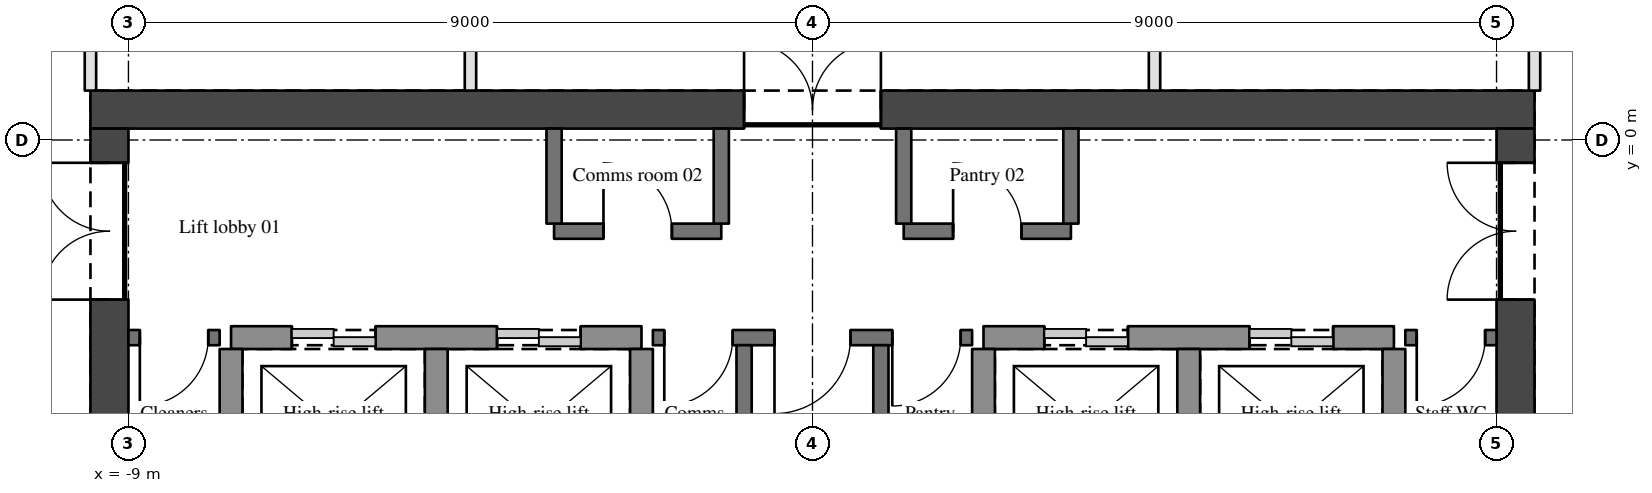
"""IFC4 building model, lengths in metres.
Left out: names, types, materials, properties, quantities, classifications, styles, units other than length and angle.
Written with IfcOpenShell. Run it as: python <this file> out.ifc"""

import sys

from ifc_helpers import new_model, si_unit, direction, frame, frame_2d, origin, place, context, subcontext, project, spatial, rectangle, extrude, element, fill, save


model = new_model("IFC4")
c1 = context("Model", 3, precision=1e-05, world=origin(), true_north=direction((0.0, 1.0)))
c2 = subcontext(c1, "Body", "Model", "MODEL_VIEW")
j1 = project(units=[si_unit("LENGTHUNIT", "METRE"), si_unit("PLANEANGLEUNIT", "RADIAN")], contexts=[c1])
p1 = place(None, origin())
s1 = spatial("IfcSite", under=j1, at=p1, CompositionType="ELEMENT")
p2 = place(p1, origin())
s2 = spatial("IfcBuilding", under=s1, at=p2, CompositionType="ELEMENT")
p3 = place(p2, frame((0.0, 0.0, 206.85)))
s3 = spatial("IfcBuildingStorey", under=s2, at=p3, CompositionType="ELEMENT", Elevation=206.85)
p4 = place(p3, frame((-9.5, 0.4, 0.0), z_axis=(0.0, 0.0, 1.0), x_axis=(1.0, 0.0, 0.0)))
e1 = element("IfcWall", 1, at=p4, inside=s3, PredefinedType="SHEAR", context=c2, shape_type="SweptSolid", body=[
    extrude(rectangle(XDim=19.0, YDim=0.5, at=frame_2d((9.5, 0.0))), origin(), (0.0, 0.0, 1.0), 3.15),
])
p5 = place(p4, frame((8.6, 0.0, 0.0)))
e2 = element("IfcOpeningElement", 2, at=p5, cuts=e1, PredefinedType="OPENING", context=c2, shape_type="SweptSolid", body=[
    extrude(rectangle(XDim=1.8, YDim=2.1, at=frame_2d((0.9, 1.05))), frame((0.0, 0.26, 0.0), z_axis=(0.0, -1.0, 0.0), x_axis=(1.0, 0.0, 0.0)), (0.0, 0.0, 1.0), 0.52),
])
p6 = place(p3, frame((-9.25, -11.5, 0.0), z_axis=(0.0, 0.0, 1.0), x_axis=(0.0, 1.0, 0.0)))
e3 = element("IfcWall", 3, at=p6, inside=s3, PredefinedType="SHEAR", context=c2, shape_type="SweptSolid", body=[
    extrude(rectangle(XDim=11.65, YDim=0.5, at=frame_2d((5.825, 0.0))), origin(), (0.0, 0.0, 1.0), 3.15),
])
p7 = place(p6, frame((9.4, 0.0, 0.0)))
e4 = element("IfcOpeningElement", 4, at=p7, cuts=e3, PredefinedType="OPENING", context=c2, shape_type="SweptSolid", body=[
    extrude(rectangle(XDim=1.8, YDim=2.1, at=frame_2d((0.9, 1.05))), frame((0.0, 0.26, 0.0), z_axis=(0.0, -1.0, 0.0), x_axis=(1.0, 0.0, 0.0)), (0.0, 0.0, 1.0), 0.52),
])
p8 = place(p3, frame((9.25, -11.5, 0.0), z_axis=(0.0, 0.0, 1.0), x_axis=(0.0, 1.0, 0.0)))
e5 = element("IfcWall", 5, at=p8, inside=s3, PredefinedType="SHEAR", context=c2, shape_type="SweptSolid", body=[
    extrude(rectangle(XDim=11.65, YDim=0.5, at=frame_2d((5.825, 0.0))), origin(), (0.0, 0.0, 1.0), 3.15),
])
p9 = place(p8, frame((9.4, 0.0, 0.0)))
e6 = element("IfcOpeningElement", 6, at=p9, cuts=e5, PredefinedType="OPENING", context=c2, shape_type="SweptSolid", body=[
    extrude(rectangle(XDim=1.8, YDim=2.1, at=frame_2d((0.9, 1.05))), frame((0.0, 0.26, 0.0), z_axis=(0.0, -1.0, 0.0), x_axis=(1.0, 0.0, 0.0)), (0.0, 0.0, 1.0), 0.52),
])
p10 = place(p3, frame((-7.8, -2.6, 0.0), z_axis=(0.0, 0.0, 1.0), x_axis=(-1.0, 0.0, 0.0)))
e7 = element("IfcWall", 7, at=p10, inside=s3, PredefinedType="SOLIDWALL", context=c2, shape_type="SweptSolid", body=[
    extrude(rectangle(XDim=1.2, YDim=0.2, at=frame_2d((0.6, 0.0))), origin(), (0.0, 0.0, 1.0), 2.85),
])
p11 = place(p10, frame((0.15, 0.0, 0.0)))
e8 = element("IfcOpeningElement", 8, at=p11, cuts=e7, PredefinedType="OPENING", context=c2, shape_type="SweptSolid", body=[
    extrude(rectangle(XDim=0.9, YDim=2.1, at=frame_2d((0.45, 1.05))), frame((0.0, 0.11, 0.0), z_axis=(0.0, -1.0, 0.0), x_axis=(1.0, 0.0, 0.0)), (0.0, 0.0, 1.0), 0.22),
])
p12 = place(p3, frame((-7.65, -2.6, 0.0), z_axis=(0.0, 0.0, 1.0), x_axis=(1.0, 0.0, 0.0)))
e9 = element("IfcWall", 9, at=p12, inside=s3, PredefinedType="SHEAR", context=c2, shape_type="SweptSolid", body=[
    extrude(rectangle(XDim=5.4, YDim=0.3, at=frame_2d((2.7, 0.0))), origin(), (0.0, 0.0, 1.0), 3.15),
])
p13 = place(p12, frame((0.8, 0.0, 0.0)))
e10 = element("IfcOpeningElement", 10, at=p13, cuts=e9, PredefinedType="OPENING", context=c2, shape_type="SweptSolid", body=[
    extrude(rectangle(XDim=1.1, YDim=2.1, at=frame_2d((0.55, 1.05))), frame((0.0, 0.16, 0.0), z_axis=(0.0, -1.0, 0.0), x_axis=(1.0, 0.0, 0.0)), (0.0, 0.0, 1.0), 0.32),
])
p14 = place(p12, frame((3.5, 0.0, 0.0)))
e11 = element("IfcOpeningElement", 11, at=p14, cuts=e9, PredefinedType="OPENING", context=c2, shape_type="SweptSolid", body=[
    extrude(rectangle(XDim=1.1, YDim=2.1, at=frame_2d((0.55, 1.05))), frame((0.0, 0.16, 0.0), z_axis=(0.0, -1.0, 0.0), x_axis=(1.0, 0.0, 0.0)), (0.0, 0.0, 1.0), 0.32),
])
p15 = place(p3, frame((2.1, -2.6, 0.0), z_axis=(0.0, 0.0, 1.0), x_axis=(-1.0, 0.0, 0.0)))
e12 = element("IfcWall", 12, at=p15, inside=s3, PredefinedType="SOLIDWALL", context=c2, shape_type="SweptSolid", body=[
    extrude(rectangle(XDim=4.2, YDim=0.2, at=frame_2d((2.1, 0.0))), origin(), (0.0, 0.0, 1.0), 2.85),
])
p16 = place(p15, frame((1.6, 0.0, 0.0)))
e13 = element("IfcOpeningElement", 13, at=p16, cuts=e12, PredefinedType="OPENING", context=c2, shape_type="SweptSolid", body=[
    extrude(rectangle(XDim=1.0, YDim=2.1, at=frame_2d((0.5, 1.05))), frame((0.0, 0.11, 0.0), z_axis=(0.0, -1.0, 0.0), x_axis=(1.0, 0.0, 0.0)), (0.0, 0.0, 1.0), 0.22),
])
p17 = place(p15, frame((3.15, 0.0, 0.0)))
e14 = element("IfcOpeningElement", 14, at=p17, cuts=e12, PredefinedType="OPENING", context=c2, shape_type="SweptSolid", body=[
    extrude(rectangle(XDim=0.9, YDim=2.1, at=frame_2d((0.45, 1.05))), frame((0.0, 0.11, 0.0), z_axis=(0.0, -1.0, 0.0), x_axis=(1.0, 0.0, 0.0)), (0.0, 0.0, 1.0), 0.22),
])
p18 = place(p15, frame((0.15, 0.0, 0.0)))
e15 = element("IfcOpeningElement", 15, at=p18, cuts=e12, PredefinedType="OPENING", context=c2, shape_type="SweptSolid", body=[
    extrude(rectangle(XDim=0.9, YDim=2.1, at=frame_2d((0.45, 1.05))), frame((0.0, 0.11, 0.0), z_axis=(0.0, -1.0, 0.0), x_axis=(1.0, 0.0, 0.0)), (0.0, 0.0, 1.0), 0.22),
])
p19 = place(p3, frame((2.25, -2.6, 0.0), z_axis=(0.0, 0.0, 1.0), x_axis=(1.0, 0.0, 0.0)))
e16 = element("IfcWall", 16, at=p19, inside=s3, PredefinedType="SHEAR", context=c2, shape_type="SweptSolid", body=[
    extrude(rectangle(XDim=5.4, YDim=0.3, at=frame_2d((2.7, 0.0))), origin(), (0.0, 0.0, 1.0), 3.15),
])
p20 = place(p19, frame((0.8, 0.0, 0.0)))
e17 = element("IfcOpeningElement", 17, at=p20, cuts=e16, PredefinedType="OPENING", context=c2, shape_type="SweptSolid", body=[
    extrude(rectangle(XDim=1.1, YDim=2.1, at=frame_2d((0.55, 1.05))), frame((0.0, 0.16, 0.0), z_axis=(0.0, -1.0, 0.0), x_axis=(1.0, 0.0, 0.0)), (0.0, 0.0, 1.0), 0.32),
])
p21 = place(p19, frame((3.5, 0.0, 0.0)))
e18 = element("IfcOpeningElement", 18, at=p21, cuts=e16, PredefinedType="OPENING", context=c2, shape_type="SweptSolid", body=[
    extrude(rectangle(XDim=1.1, YDim=2.1, at=frame_2d((0.55, 1.05))), frame((0.0, 0.16, 0.0), z_axis=(0.0, -1.0, 0.0), x_axis=(1.0, 0.0, 0.0)), (0.0, 0.0, 1.0), 0.32),
])
p22 = place(p3, frame((9.0, -2.6, 0.0), z_axis=(0.0, 0.0, 1.0), x_axis=(-1.0, 0.0, 0.0)))
e19 = element("IfcWall", 19, at=p22, inside=s3, PredefinedType="SOLIDWALL", context=c2, shape_type="SweptSolid", body=[
    extrude(rectangle(XDim=1.2, YDim=0.2, at=frame_2d((0.6, 0.0))), origin(), (0.0, 0.0, 1.0), 2.85),
])
p23 = place(p22, frame((0.15, 0.0, 0.0)))
e20 = element("IfcOpeningElement", 20, at=p23, cuts=e19, PredefinedType="OPENING", context=c2, shape_type="SweptSolid", body=[
    extrude(rectangle(XDim=0.9, YDim=2.1, at=frame_2d((0.45, 1.05))), frame((0.0, 0.11, 0.0), z_axis=(0.0, -1.0, 0.0), x_axis=(1.0, 0.0, 0.0)), (0.0, 0.0, 1.0), 0.22),
])
p24 = place(p3, frame((-3.4, -1.2, 0.0), z_axis=(0.0, 0.0, 1.0), x_axis=(1.0, 0.0, 0.0)))
e21 = element("IfcWall", 21, at=p24, inside=s3, PredefinedType="SOLIDWALL", context=c2, shape_type="SweptSolid", body=[
    extrude(rectangle(XDim=2.2, YDim=0.2, at=frame_2d((1.1, 0.0))), origin(), (0.0, 0.0, 1.0), 2.85),
])
p25 = place(p24, frame((0.65, 0.0, 0.0)))
e22 = element("IfcOpeningElement", 22, at=p25, cuts=e21, PredefinedType="OPENING", context=c2, shape_type="SweptSolid", body=[
    extrude(rectangle(XDim=0.9, YDim=2.1, at=frame_2d((0.45, 1.05))), frame((0.0, 0.11, 0.0), z_axis=(0.0, -1.0, 0.0), x_axis=(1.0, 0.0, 0.0)), (0.0, 0.0, 1.0), 0.22),
])
p26 = place(p3, frame((1.2, -1.2, 0.0), z_axis=(0.0, 0.0, 1.0), x_axis=(1.0, 0.0, 0.0)))
e23 = element("IfcWall", 23, at=p26, inside=s3, PredefinedType="SOLIDWALL", context=c2, shape_type="SweptSolid", body=[
    extrude(rectangle(XDim=2.2, YDim=0.2, at=frame_2d((1.1, 0.0))), origin(), (0.0, 0.0, 1.0), 2.85),
])
p27 = place(p26, frame((0.65, 0.0, 0.0)))
e24 = element("IfcOpeningElement", 24, at=p27, cuts=e23, PredefinedType="OPENING", context=c2, shape_type="SweptSolid", body=[
    extrude(rectangle(XDim=0.9, YDim=2.1, at=frame_2d((0.45, 1.05))), frame((0.0, 0.11, 0.0), z_axis=(0.0, -1.0, 0.0), x_axis=(1.0, 0.0, 0.0)), (0.0, 0.0, 1.0), 0.22),
])
p28 = place(p3, frame((-9.5, 9.5, 0.0), z_axis=(0.0, 0.0, 1.0), x_axis=(0.0, -1.0, 0.0)))
e25 = element("IfcWall", 25, at=p28, inside=s3, PredefinedType="PARTITIONING", context=c2, shape_type="SweptSolid", body=[
    extrude(rectangle(XDim=8.85, YDim=0.15, at=frame_2d((4.425, 0.0))), origin(), (0.0, 0.0, 1.0), 2.21),
])
p29 = place(p28, frame((6.025, 0.0, 0.0)))
e26 = element("IfcOpeningElement", 26, at=p29, cuts=e25, PredefinedType="OPENING", context=c2, shape_type="SweptSolid", body=[
    extrude(rectangle(XDim=0.9, YDim=2.1, at=frame_2d((0.45, 1.05))), frame((0.0, 0.085, 0.0), z_axis=(0.0, -1.0, 0.0), x_axis=(1.0, 0.0, 0.0)), (0.0, 0.0, 1.0), 0.17),
])
for number, where, z_axis, x_axis in (
    (27, (-7.65, -4.8, 0.0), (0.0, 0.0, 1.0), (0.0, 1.0, 0.0)),
    (28, (-4.95, -4.8, 0.0), (0.0, 0.0, 1.0), (0.0, 1.0, 0.0)),
):
    element("IfcWall", number, at=place(p3, frame(where, z_axis=z_axis, x_axis=x_axis)), inside=s3, PredefinedType="SHEAR", context=c2, shape_type="SweptSolid", body=[
        extrude(rectangle(XDim=2.05, YDim=0.3, at=frame_2d((1.025, 0.0))), origin(), (0.0, 0.0, 1.0), 3.15),
    ])
p30 = place(p3, frame((-4.5, 0.65, 0.0), z_axis=(0.0, 0.0, 1.0), x_axis=(0.0, 1.0, 0.0)))
e29 = element("IfcWall", 29, at=p30, inside=s3, PredefinedType="PARTITIONING", context=c2, shape_type="SweptSolid", body=[
    extrude(rectangle(XDim=4.65, YDim=0.15, at=frame_2d((2.325, 0.0))), origin(), (0.0, 0.0, 1.0), 2.21),
])
p31 = place(p3, frame((-3.4, -1.1, 0.0), z_axis=(0.0, 0.0, 1.0), x_axis=(0.0, 1.0, 0.0)))
e30 = element("IfcWall", 30, at=p31, inside=s3, PredefinedType="SOLIDWALL", context=c2, shape_type="SweptSolid", body=[
    extrude(rectangle(XDim=1.25, YDim=0.2, at=frame_2d((0.625, 0.0))), origin(), (0.0, 0.0, 1.0), 2.85),
])
p32 = place(p3, frame((-2.25, -4.8, 0.0), z_axis=(0.0, 0.0, 1.0), x_axis=(0.0, 1.0, 0.0)))
e31 = element("IfcWall", 31, at=p32, inside=s3, PredefinedType="SHEAR", context=c2, shape_type="SweptSolid", body=[
    extrude(rectangle(XDim=2.05, YDim=0.3, at=frame_2d((1.025, 0.0))), origin(), (0.0, 0.0, 1.0), 3.15),
])
p33 = place(p3, frame((-1.2, -1.1, 0.0), z_axis=(0.0, 0.0, 1.0), x_axis=(0.0, 1.0, 0.0)))
e32 = element("IfcWall", 32, at=p33, inside=s3, PredefinedType="SOLIDWALL", context=c2, shape_type="SweptSolid", body=[
    extrude(rectangle(XDim=1.25, YDim=0.2, at=frame_2d((0.625, 0.0))), origin(), (0.0, 0.0, 1.0), 2.85),
])
for number, where, z_axis, x_axis in (
    (33, (-0.9, -4.85, 0.0), (0.0, 0.0, 1.0), (0.0, 1.0, 0.0)),
    (34, (0.9, -4.85, 0.0), (0.0, 0.0, 1.0), (0.0, 1.0, 0.0)),
):
    element("IfcWall", number, at=place(p3, frame(where, z_axis=z_axis, x_axis=x_axis)), inside=s3, PredefinedType="SOLIDWALL", context=c2, shape_type="SweptSolid", body=[
        extrude(rectangle(XDim=2.15, YDim=0.2, at=frame_2d((1.075, 0.0))), origin(), (0.0, 0.0, 1.0), 2.85),
    ])
p34 = place(p3, frame((1.2, -1.1, 0.0), z_axis=(0.0, 0.0, 1.0), x_axis=(0.0, 1.0, 0.0)))
e35 = element("IfcWall", 35, at=p34, inside=s3, PredefinedType="SOLIDWALL", context=c2, shape_type="SweptSolid", body=[
    extrude(rectangle(XDim=1.25, YDim=0.2, at=frame_2d((0.625, 0.0))), origin(), (0.0, 0.0, 1.0), 2.85),
])
p35 = place(p3, frame((2.25, -4.8, 0.0), z_axis=(0.0, 0.0, 1.0), x_axis=(0.0, 1.0, 0.0)))
e36 = element("IfcWall", 36, at=p35, inside=s3, PredefinedType="SHEAR", context=c2, shape_type="SweptSolid", body=[
    extrude(rectangle(XDim=2.05, YDim=0.3, at=frame_2d((1.025, 0.0))), origin(), (0.0, 0.0, 1.0), 3.15),
])
p36 = place(p3, frame((3.4, -1.1, 0.0), z_axis=(0.0, 0.0, 1.0), x_axis=(0.0, 1.0, 0.0)))
e37 = element("IfcWall", 37, at=p36, inside=s3, PredefinedType="SOLIDWALL", context=c2, shape_type="SweptSolid", body=[
    extrude(rectangle(XDim=1.25, YDim=0.2, at=frame_2d((0.625, 0.0))), origin(), (0.0, 0.0, 1.0), 2.85),
])
p37 = place(p3, frame((4.5, 0.65, 0.0), z_axis=(0.0, 0.0, 1.0), x_axis=(0.0, 1.0, 0.0)))
e38 = element("IfcWall", 38, at=p37, inside=s3, PredefinedType="PARTITIONING", context=c2, shape_type="SweptSolid", body=[
    extrude(rectangle(XDim=4.675, YDim=0.15, at=frame_2d((2.337, 0.0))), origin(), (0.0, 0.0, 1.0), 2.21),
])
for number, where, z_axis, x_axis in (
    (39, (4.95, -4.8, 0.0), (0.0, 0.0, 1.0), (0.0, 1.0, 0.0)),
    (40, (7.65, -4.8, 0.0), (0.0, 0.0, 1.0), (0.0, 1.0, 0.0)),
):
    element("IfcWall", number, at=place(p3, frame(where, z_axis=z_axis, x_axis=x_axis)), inside=s3, PredefinedType="SHEAR", context=c2, shape_type="SweptSolid", body=[
        extrude(rectangle(XDim=2.05, YDim=0.3, at=frame_2d((1.025, 0.0))), origin(), (0.0, 0.0, 1.0), 3.15),
    ])
p38 = place(p3, frame((9.5, 0.65, 0.0), z_axis=(0.0, 0.0, 1.0), x_axis=(0.0, 1.0, 0.0)))
e41 = element("IfcWall", 41, at=p38, inside=s3, PredefinedType="PARTITIONING", context=c2, shape_type="SweptSolid", body=[
    extrude(rectangle(XDim=8.85, YDim=0.15, at=frame_2d((4.425, 0.0))), origin(), (0.0, 0.0, 1.0), 2.21),
])
p39 = place(p7, origin())
e42 = element("IfcDoor", 42, at=p39, inside=s3, OperationType="DOUBLE_DOOR_SINGLE_SWING", PredefinedType="DOOR", context=c2, shape_type="SweptSolid", body=[
    extrude(rectangle(XDim=1.8, YDim=2.1, at=frame_2d((0.9, 1.05))), frame((0.0, 0.025, 0.0), z_axis=(0.0, -1.0, 0.0), x_axis=(1.0, 0.0, 0.0)), (0.0, 0.0, 1.0), 0.05),
])
fill(e4, e42)
p40 = place(p9, origin())
e43 = element("IfcDoor", 43, at=p40, inside=s3, OperationType="DOUBLE_DOOR_SINGLE_SWING", PredefinedType="DOOR", context=c2, shape_type="SweptSolid", body=[
    extrude(rectangle(XDim=1.8, YDim=2.1, at=frame_2d((0.9, 1.05))), frame((0.0, 0.025, 0.0), z_axis=(0.0, -1.0, 0.0), x_axis=(1.0, 0.0, 0.0)), (0.0, 0.0, 1.0), 0.05),
])
fill(e6, e43)
p41 = place(p5, origin())
e44 = element("IfcDoor", 44, at=p41, inside=s3, OperationType="DOUBLE_DOOR_SINGLE_SWING", PredefinedType="DOOR", context=c2, shape_type="SweptSolid", body=[
    extrude(rectangle(XDim=1.8, YDim=2.1, at=frame_2d((0.9, 1.05))), frame((0.0, 0.025, 0.0), z_axis=(0.0, -1.0, 0.0), x_axis=(1.0, 0.0, 0.0)), (0.0, 0.0, 1.0), 0.05),
])
fill(e2, e44)
p42 = place(p16, origin())
e45 = element("IfcDoor", 45, at=p42, inside=s3, OperationType="SINGLE_SWING_RIGHT", PredefinedType="DOOR", context=c2, shape_type="SweptSolid", body=[
    extrude(rectangle(XDim=1.0, YDim=2.1, at=frame_2d((0.5, 1.05))), frame((0.0, 0.025, 0.0), z_axis=(0.0, -1.0, 0.0), x_axis=(1.0, 0.0, 0.0)), (0.0, 0.0, 1.0), 0.05),
])
fill(e13, e45)
p43 = place(p17, origin())
e46 = element("IfcDoor", 46, at=p43, inside=s3, OperationType="SINGLE_SWING_RIGHT", PredefinedType="DOOR", context=c2, shape_type="SweptSolid", body=[
    extrude(rectangle(XDim=0.9, YDim=2.1, at=frame_2d((0.45, 1.05))), frame((0.0, 0.025, 0.0), z_axis=(0.0, -1.0, 0.0), x_axis=(1.0, 0.0, 0.0)), (0.0, 0.0, 1.0), 0.05),
])
fill(e14, e46)
p44 = place(p18, origin())
e47 = element("IfcDoor", 47, at=p44, inside=s3, OperationType="SINGLE_SWING_RIGHT", PredefinedType="DOOR", context=c2, shape_type="SweptSolid", body=[
    extrude(rectangle(XDim=0.9, YDim=2.1, at=frame_2d((0.45, 1.05))), frame((0.0, 0.025, 0.0), z_axis=(0.0, -1.0, 0.0), x_axis=(1.0, 0.0, 0.0)), (0.0, 0.0, 1.0), 0.05),
])
fill(e15, e47)
p45 = place(p23, origin())
e48 = element("IfcDoor", 48, at=p45, inside=s3, OperationType="SINGLE_SWING_RIGHT", PredefinedType="DOOR", context=c2, shape_type="SweptSolid", body=[
    extrude(rectangle(XDim=0.9, YDim=2.1, at=frame_2d((0.45, 1.05))), frame((0.0, 0.025, 0.0), z_axis=(0.0, -1.0, 0.0), x_axis=(1.0, 0.0, 0.0)), (0.0, 0.0, 1.0), 0.05),
])
fill(e20, e48)
p46 = place(p11, origin())
e49 = element("IfcDoor", 49, at=p46, inside=s3, OperationType="SINGLE_SWING_RIGHT", PredefinedType="DOOR", context=c2, shape_type="SweptSolid", body=[
    extrude(rectangle(XDim=0.9, YDim=2.1, at=frame_2d((0.45, 1.05))), frame((0.0, 0.025, 0.0), z_axis=(0.0, -1.0, 0.0), x_axis=(1.0, 0.0, 0.0)), (0.0, 0.0, 1.0), 0.05),
])
fill(e8, e49)
p47 = place(p25, origin())
e50 = element("IfcDoor", 50, at=p47, inside=s3, OperationType="SINGLE_SWING_LEFT", PredefinedType="DOOR", context=c2, shape_type="SweptSolid", body=[
    extrude(rectangle(XDim=0.9, YDim=2.1, at=frame_2d((0.45, 1.05))), frame((0.0, 0.025, 0.0), z_axis=(0.0, -1.0, 0.0), x_axis=(1.0, 0.0, 0.0)), (0.0, 0.0, 1.0), 0.05),
])
fill(e22, e50)
p48 = place(p27, origin())
e51 = element("IfcDoor", 51, at=p48, inside=s3, OperationType="SINGLE_SWING_LEFT", PredefinedType="DOOR", context=c2, shape_type="SweptSolid", body=[
    extrude(rectangle(XDim=0.9, YDim=2.1, at=frame_2d((0.45, 1.05))), frame((0.0, 0.025, 0.0), z_axis=(0.0, -1.0, 0.0), x_axis=(1.0, 0.0, 0.0)), (0.0, 0.0, 1.0), 0.05),
])
fill(e24, e51)
p49 = place(p13, origin())
e52 = element("IfcDoor", 52, at=p49, inside=s3, OperationType="DOUBLE_DOOR_SLIDING", PredefinedType="DOOR", context=c2, shape_type="SweptSolid", body=[
    extrude(rectangle(XDim=1.1, YDim=2.1, at=frame_2d((0.55, 1.05))), frame((0.0, 0.025, 0.0), z_axis=(0.0, -1.0, 0.0), x_axis=(1.0, 0.0, 0.0)), (0.0, 0.0, 1.0), 0.05),
])
fill(e10, e52)
p50 = place(p14, origin())
e53 = element("IfcDoor", 53, at=p50, inside=s3, OperationType="DOUBLE_DOOR_SLIDING", PredefinedType="DOOR", context=c2, shape_type="SweptSolid", body=[
    extrude(rectangle(XDim=1.1, YDim=2.1, at=frame_2d((0.55, 1.05))), frame((0.0, 0.025, 0.0), z_axis=(0.0, -1.0, 0.0), x_axis=(1.0, 0.0, 0.0)), (0.0, 0.0, 1.0), 0.05),
])
fill(e11, e53)
p51 = place(p20, origin())
e54 = element("IfcDoor", 54, at=p51, inside=s3, OperationType="DOUBLE_DOOR_SLIDING", PredefinedType="DOOR", context=c2, shape_type="SweptSolid", body=[
    extrude(rectangle(XDim=1.1, YDim=2.1, at=frame_2d((0.55, 1.05))), frame((0.0, 0.025, 0.0), z_axis=(0.0, -1.0, 0.0), x_axis=(1.0, 0.0, 0.0)), (0.0, 0.0, 1.0), 0.05),
])
fill(e17, e54)
p52 = place(p21, origin())
e55 = element("IfcDoor", 55, at=p52, inside=s3, OperationType="DOUBLE_DOOR_SLIDING", PredefinedType="DOOR", context=c2, shape_type="SweptSolid", body=[
    extrude(rectangle(XDim=1.1, YDim=2.1, at=frame_2d((0.55, 1.05))), frame((0.0, 0.025, 0.0), z_axis=(0.0, -1.0, 0.0), x_axis=(1.0, 0.0, 0.0)), (0.0, 0.0, 1.0), 0.05),
])
fill(e18, e55)
save(model, sys.argv[1])
